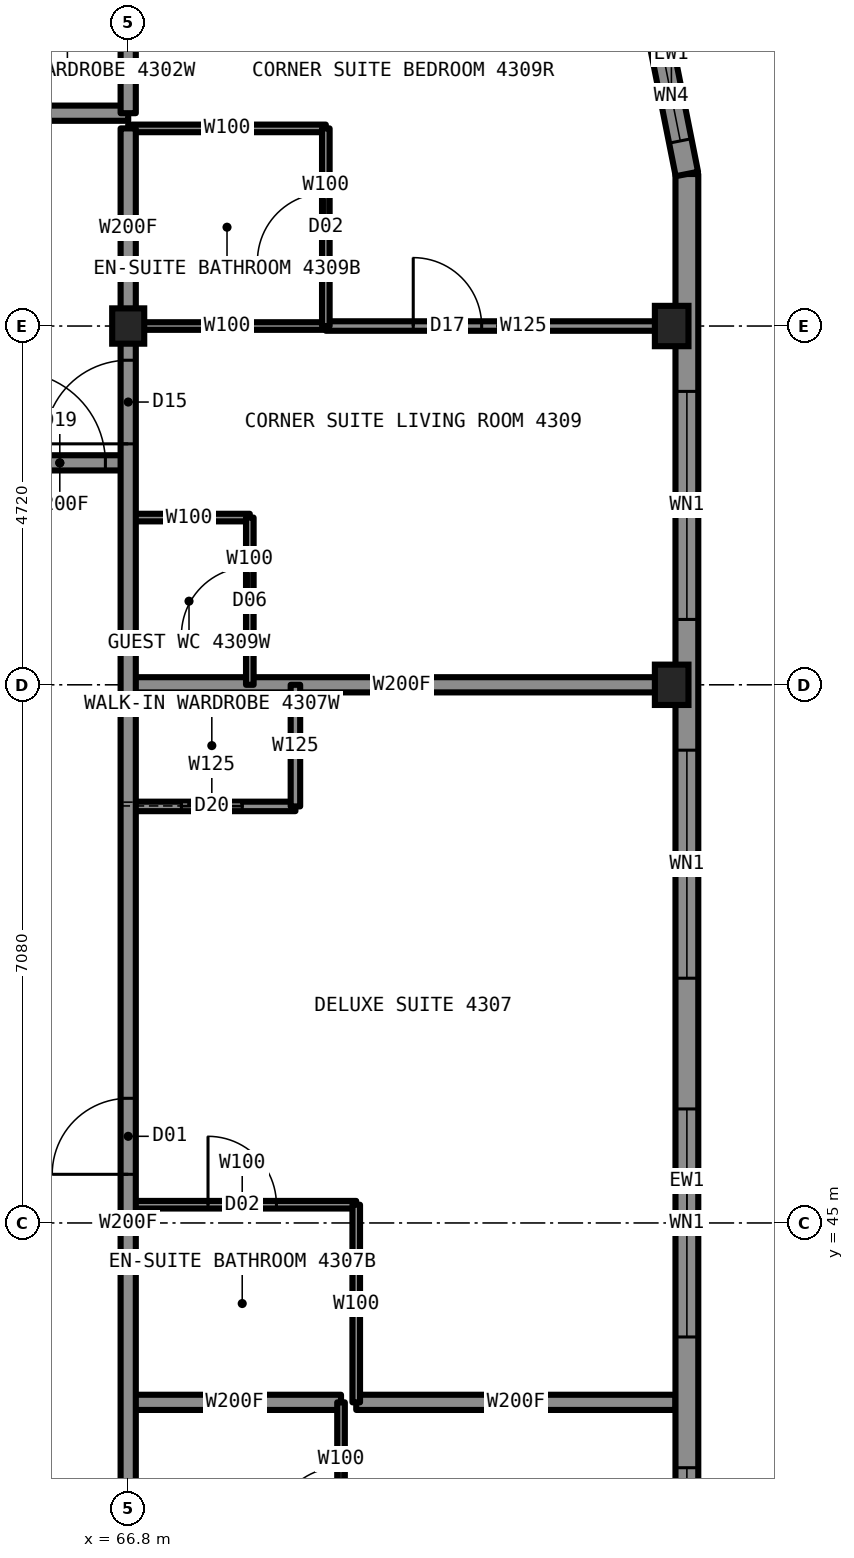
"""IFC4 building model, lengths in metres.
Left out: names, types, materials, properties, quantities, classifications, styles, units other than length and angle.
Written with IfcOpenShell. Run it as: python <this file> out.ifc"""

import sys

from ifc_helpers import new_model, si_unit, direction, frame, frame_2d, origin, origin_2d, place, context, subcontext, project, spatial, rectangle, i_section, extrude, element, fill, save


model = new_model("IFC4")
c1 = context("Model", 3, precision=1e-05, world=origin(), true_north=direction((0.0, 1.0)))
c2 = subcontext(c1, "Body", "Model", "MODEL_VIEW")
j1 = project(units=[si_unit("LENGTHUNIT", "METRE"), si_unit("PLANEANGLEUNIT", "RADIAN")], contexts=[c1])
p1 = place(None, origin())
s1 = spatial("IfcSite", under=j1, at=p1, CompositionType="ELEMENT")
p2 = place(p1, origin())
s2 = spatial("IfcBuilding", under=s1, at=p2, CompositionType="ELEMENT")
p3 = place(p2, frame((0.0, 0.0, 161.8)))
s3 = spatial("IfcBuildingStorey", under=s2, at=p3, CompositionType="ELEMENT", Elevation=161.8)
for number, where, z_axis, x_axis in (
    (1, (73.95, 52.08, 0.0), (0.0, 0.0, 1.0), (1.0, 0.0, 0.0)),
    (2, (73.95, 56.8, 0.0), (0.0, 0.0, 1.0), (1.0, 0.0, 0.0)),
):
    element("IfcColumn", number, at=place(p3, frame(where, z_axis=z_axis, x_axis=x_axis)), inside=s3, PredefinedType="COLUMN", context=c2, shape_type="SweptSolid", body=[
        extrude(i_section(OverallWidth=0.442, OverallDepth=0.531, WebThickness=0.066, FlangeThickness=0.106, at=origin_2d()), origin(), (0.0, 0.0, 1.0), 3.5),
    ])
p4 = place(p3, frame((66.8, 56.8, 0.0), z_axis=(0.0, 0.0, 1.0), x_axis=(1.0, 0.0, 0.0)))
e3 = element("IfcColumn", 3, at=p4, inside=s3, PredefinedType="COLUMN", context=c2, shape_type="SweptSolid", body=[
    extrude(i_section(OverallWidth=0.422, OverallDepth=0.465, WebThickness=0.045, FlangeThickness=0.073, at=origin_2d()), origin(), (0.0, 0.0, 1.0), 3.5),
])
p5 = place(p3, frame((66.8, 42.64, 0.0), z_axis=(0.0, 0.0, 1.0), x_axis=(1.0, 0.0, 0.0)))
e4 = element("IfcWall", 4, at=p5, inside=s3, PredefinedType="PARTITIONING", context=c2, shape_type="SweptSolid", body=[
    extrude(rectangle(XDim=2.8, YDim=0.2, at=frame_2d((1.4, 0.0))), origin(), (0.0, 0.0, 1.0), 2.73),
])
p6 = place(p3, frame((69.8, 42.64, 0.0), z_axis=(0.0, 0.0, 1.0), x_axis=(1.0, 0.0, 0.0)))
e5 = element("IfcWall", 5, at=p6, inside=s3, PredefinedType="PARTITIONING", context=c2, shape_type="SweptSolid", body=[
    extrude(rectangle(XDim=4.2, YDim=0.2, at=frame_2d((2.1, 0.0))), origin(), (0.0, 0.0, 1.0), 2.73),
])
p7 = place(p3, frame((66.8, 45.24, 0.0), z_axis=(0.0, 0.0, 1.0), x_axis=(1.0, 0.0, 0.0)))
e6 = element("IfcWall", 6, at=p7, inside=s3, PredefinedType="PARTITIONING", context=c2, shape_type="SweptSolid", body=[
    extrude(rectangle(XDim=3.0, YDim=0.1, at=frame_2d((1.5, 0.0))), origin(), (0.0, 0.0, 1.0), 3.33),
])
p8 = place(p7, frame((1.05, 0.0, 0.0)))
e7 = element("IfcOpeningElement", 7, at=p8, cuts=e6, PredefinedType="OPENING", context=c2, shape_type="SweptSolid", body=[
    extrude(rectangle(XDim=0.9, YDim=2.1, at=frame_2d((0.45, 1.05))), frame((0.0, 0.06, 0.0), z_axis=(0.0, -1.0, 0.0), x_axis=(1.0, 0.0, 0.0)), (0.0, 0.0, 1.0), 0.12),
])
p9 = place(p3, frame((65.0, 55.0, 0.0), z_axis=(0.0, 0.0, 1.0), x_axis=(1.0, 0.0, 0.0)))
e8 = element("IfcWall", 8, at=p9, inside=s3, PredefinedType="PARTITIONING", context=c2, shape_type="SweptSolid", body=[
    extrude(rectangle(XDim=1.8, YDim=0.2, at=frame_2d((0.9, 0.0))), origin(), (0.0, 0.0, 1.0), 3.33),
])
p10 = place(p9, frame((0.3, 0.0, 0.0)))
e9 = element("IfcOpeningElement", 9, at=p10, cuts=e8, PredefinedType="OPENING", context=c2, shape_type="SweptSolid", body=[
    extrude(rectangle(XDim=1.2, YDim=2.2, at=frame_2d((0.6, 1.1))), frame((0.0, 0.11, 0.0), z_axis=(0.0, -1.0, 0.0), x_axis=(1.0, 0.0, 0.0)), (0.0, 0.0, 1.0), 0.22),
])
p11 = place(p3, frame((66.8, 56.8, 0.0), z_axis=(0.0, 0.0, 1.0), x_axis=(1.0, 0.0, 0.0)))
e10 = element("IfcWall", 10, at=p11, inside=s3, PredefinedType="PARTITIONING", context=c2, shape_type="SweptSolid", body=[
    extrude(rectangle(XDim=2.6, YDim=0.1, at=frame_2d((1.3, 0.0))), origin(), (0.0, 0.0, 1.0), 2.573),
])
p12 = place(p3, frame((69.4, 56.8, 0.0), z_axis=(0.0, 0.0, 1.0), x_axis=(1.0, 0.0, 0.0)))
e11 = element("IfcWall", 11, at=p12, inside=s3, PredefinedType="PARTITIONING", context=c2, shape_type="SweptSolid", body=[
    extrude(rectangle(XDim=4.6, YDim=0.125, at=frame_2d((2.3, 0.0))), origin(), (0.0, 0.0, 1.0), 2.573),
])
p13 = place(p12, frame((1.15, 0.0, 0.0)))
e12 = element("IfcOpeningElement", 12, at=p13, cuts=e11, PredefinedType="OPENING", context=c2, shape_type="SweptSolid", body=[
    extrude(rectangle(XDim=0.9, YDim=2.2, at=frame_2d((0.45, 1.1))), frame((0.0, 0.073, 0.0), z_axis=(0.0, -1.0, 0.0), x_axis=(1.0, 0.0, 0.0)), (0.0, 0.0, 1.0), 0.145),
])
p14 = place(p3, frame((66.8, 59.4, 0.0), z_axis=(0.0, 0.0, 1.0), x_axis=(1.0, 0.0, 0.0)))
e13 = element("IfcWall", 13, at=p14, inside=s3, PredefinedType="PARTITIONING", context=c2, shape_type="SweptSolid", body=[
    extrude(rectangle(XDim=2.6, YDim=0.1, at=frame_2d((1.3, 0.0))), origin(), (0.0, 0.0, 1.0), 3.33),
])
p15 = place(p3, frame((43.2, 59.6, 0.0), z_axis=(0.0, 0.0, 1.0), x_axis=(1.0, 0.0, 0.0)))
e14 = element("IfcWall", 14, at=p15, inside=s3, PredefinedType="PARTITIONING", context=c2, shape_type="SweptSolid", body=[
    extrude(rectangle(XDim=23.6, YDim=0.2, at=frame_2d((11.8, 0.0))), origin(), (0.0, 0.0, 1.0), 3.33),
])
p16 = place(p15, frame((1.85, 0.0, 0.0)))
e15 = element("IfcOpeningElement", 15, at=p16, cuts=e14, PredefinedType="OPENING", context=c2, shape_type="SweptSolid", body=[
    extrude(rectangle(XDim=1.1, YDim=2.2, at=frame_2d((0.55, 1.1))), frame((0.0, 0.11, 0.0), z_axis=(0.0, -1.0, 0.0), x_axis=(1.0, 0.0, 0.0)), (0.0, 0.0, 1.0), 0.22),
])
p17 = place(p15, frame((17.16, 0.0, 0.0)))
e16 = element("IfcOpeningElement", 16, at=p17, cuts=e14, PredefinedType="OPENING", context=c2, shape_type="SweptSolid", body=[
    extrude(rectangle(XDim=1.0, YDim=2.2, at=frame_2d((0.5, 1.1))), frame((0.0, 0.11, 0.0), z_axis=(0.0, -1.0, 0.0), x_axis=(1.0, 0.0, 0.0)), (0.0, 0.0, 1.0), 0.22),
])
p18 = place(p3, frame((66.8, 50.48, 0.0), z_axis=(0.0, 0.0, 1.0), x_axis=(1.0, 0.0, 0.0)))
e17 = element("IfcWall", 17, at=p18, inside=s3, PredefinedType="PARTITIONING", context=c2, shape_type="SweptSolid", body=[
    extrude(rectangle(XDim=2.2, YDim=0.125, at=frame_2d((1.1, 0.0))), origin(), (0.0, 0.0, 1.0), 3.33),
])
p19 = place(p18, frame((0.7, 0.0, 0.0)))
e18 = element("IfcOpeningElement", 18, at=p19, cuts=e17, PredefinedType="OPENING", context=c2, shape_type="SweptSolid", body=[
    extrude(rectangle(XDim=0.8, YDim=2.1, at=frame_2d((0.4, 1.05))), frame((0.0, 0.073, 0.0), z_axis=(0.0, -1.0, 0.0), x_axis=(1.0, 0.0, 0.0)), (0.0, 0.0, 1.0), 0.145),
])
p20 = place(p3, frame((66.8, 52.08, 0.0), z_axis=(0.0, 0.0, 1.0), x_axis=(1.0, 0.0, 0.0)))
e19 = element("IfcWall", 19, at=p20, inside=s3, PredefinedType="PARTITIONING", context=c2, shape_type="SweptSolid", body=[
    extrude(rectangle(XDim=7.2, YDim=0.2, at=frame_2d((3.6, 0.0))), origin(), (0.0, 0.0, 1.0), 2.573),
])
p21 = place(p3, frame((66.8, 54.28, 0.0), z_axis=(0.0, 0.0, 1.0), x_axis=(1.0, 0.0, 0.0)))
e20 = element("IfcWall", 20, at=p21, inside=s3, PredefinedType="PARTITIONING", context=c2, shape_type="SweptSolid", body=[
    extrude(rectangle(XDim=1.6, YDim=0.1, at=frame_2d((0.8, 0.0))), origin(), (0.0, 0.0, 1.0), 3.33),
])
p22 = place(p3, frame((66.8, 33.22, 0.0), z_axis=(0.0, 0.0, 1.0), x_axis=(0.0, 1.0, 0.0)))
e21 = element("IfcWall", 21, at=p22, inside=s3, PredefinedType="PARTITIONING", context=c2, shape_type="SweptSolid", body=[
    extrude(rectangle(XDim=23.56, YDim=0.2, at=frame_2d((11.78, 0.0))), origin(), (0.0, 0.0, 1.0), 3.33),
])
p23 = place(p22, frame((5.1, 0.0, 0.0)))
e22 = element("IfcOpeningElement", 22, at=p23, cuts=e21, PredefinedType="OPENING", context=c2, shape_type="SweptSolid", body=[
    extrude(rectangle(XDim=1.0, YDim=2.2, at=frame_2d((0.5, 1.1))), frame((0.0, 0.11, 0.0), z_axis=(0.0, -1.0, 0.0), x_axis=(1.0, 0.0, 0.0)), (0.0, 0.0, 1.0), 0.22),
])
p24 = place(p22, frame((12.42, 0.0, 0.0)))
e23 = element("IfcOpeningElement", 23, at=p24, cuts=e21, PredefinedType="OPENING", context=c2, shape_type="SweptSolid", body=[
    extrude(rectangle(XDim=1.0, YDim=2.2, at=frame_2d((0.5, 1.1))), frame((0.0, 0.11, 0.0), z_axis=(0.0, -1.0, 0.0), x_axis=(1.0, 0.0, 0.0)), (0.0, 0.0, 1.0), 0.22),
])
p25 = place(p22, frame((22.03, 0.0, 0.0)))
e24 = element("IfcOpeningElement", 24, at=p25, cuts=e21, PredefinedType="OPENING", context=c2, shape_type="SweptSolid", body=[
    extrude(rectangle(XDim=1.1, YDim=2.2, at=frame_2d((0.55, 1.1))), frame((0.0, 0.11, 0.0), z_axis=(0.0, -1.0, 0.0), x_axis=(1.0, 0.0, 0.0)), (0.0, 0.0, 1.0), 0.22),
])
p26 = place(p22, frame((0.63, 0.0, 0.0)))
e25 = element("IfcOpeningElement", 25, at=p26, cuts=e21, PredefinedType="OPENING", context=c2, shape_type="SweptSolid", body=[
    extrude(rectangle(XDim=1.1, YDim=2.2, at=frame_2d((0.55, 1.1))), frame((0.0, 0.11, 0.0), z_axis=(0.0, -1.0, 0.0), x_axis=(1.0, 0.0, 0.0)), (0.0, 0.0, 1.0), 0.22),
])
p27 = place(p3, frame((66.8, 59.6, 0.0), z_axis=(0.0, 0.0, 1.0), x_axis=(0.0, 1.0, 0.0)))
e26 = element("IfcWall", 26, at=p27, inside=s3, PredefinedType="PARTITIONING", context=c2, shape_type="SweptSolid", body=[
    extrude(rectangle(XDim=4.4, YDim=0.2, at=frame_2d((2.2, 0.0))), origin(), (0.0, 0.0, 1.0), 2.573),
])
p28 = place(p3, frame((68.4, 52.08, 0.0), z_axis=(0.0, 0.0, 1.0), x_axis=(0.0, 1.0, 0.0)))
e27 = element("IfcWall", 27, at=p28, inside=s3, PredefinedType="PARTITIONING", context=c2, shape_type="SweptSolid", body=[
    extrude(rectangle(XDim=2.2, YDim=0.1, at=frame_2d((1.1, 0.0))), origin(), (0.0, 0.0, 1.0), 3.33),
])
p29 = place(p28, frame((0.65, 0.0, 0.0)))
e28 = element("IfcOpeningElement", 28, at=p29, cuts=e27, PredefinedType="OPENING", context=c2, shape_type="SweptSolid", body=[
    extrude(rectangle(XDim=0.9, YDim=2.1, at=frame_2d((0.45, 1.05))), frame((0.0, 0.06, 0.0), z_axis=(0.0, -1.0, 0.0), x_axis=(1.0, 0.0, 0.0)), (0.0, 0.0, 1.0), 0.12),
])
p30 = place(p3, frame((69.0, 50.48, 0.0), z_axis=(0.0, 0.0, 1.0), x_axis=(0.0, 1.0, 0.0)))
e29 = element("IfcWall", 29, at=p30, inside=s3, PredefinedType="PARTITIONING", context=c2, shape_type="SweptSolid", body=[
    extrude(rectangle(XDim=1.6, YDim=0.125, at=frame_2d((0.8, 0.0))), origin(), (0.0, 0.0, 1.0), 3.33),
])
p31 = place(p3, frame((69.4, 56.8, 0.0), z_axis=(0.0, 0.0, 1.0), x_axis=(0.0, 1.0, 0.0)))
e30 = element("IfcWall", 30, at=p31, inside=s3, PredefinedType="PARTITIONING", context=c2, shape_type="SweptSolid", body=[
    extrude(rectangle(XDim=2.6, YDim=0.1, at=frame_2d((1.3, 0.0))), origin(), (0.0, 0.0, 1.0), 3.33),
])
p32 = place(p31, frame((0.85, 0.0, 0.0)))
e31 = element("IfcOpeningElement", 31, at=p32, cuts=e30, PredefinedType="OPENING", context=c2, shape_type="SweptSolid", body=[
    extrude(rectangle(XDim=0.9, YDim=2.1, at=frame_2d((0.45, 1.05))), frame((0.0, 0.06, 0.0), z_axis=(0.0, -1.0, 0.0), x_axis=(1.0, 0.0, 0.0)), (0.0, 0.0, 1.0), 0.12),
])
p33 = place(p3, frame((69.6, 40.04, 0.0), z_axis=(0.0, 0.0, 1.0), x_axis=(0.0, 1.0, 0.0)))
e32 = element("IfcWall", 32, at=p33, inside=s3, PredefinedType="PARTITIONING", context=c2, shape_type="SweptSolid", body=[
    extrude(rectangle(XDim=2.6, YDim=0.1, at=frame_2d((1.3, 0.0))), origin(), (0.0, 0.0, 1.0), 3.33),
])
p34 = place(p33, frame((0.85, 0.0, 0.0)))
e33 = element("IfcOpeningElement", 33, at=p34, cuts=e32, PredefinedType="OPENING", context=c2, shape_type="SweptSolid", body=[
    extrude(rectangle(XDim=0.9, YDim=2.1, at=frame_2d((0.45, 1.05))), frame((0.0, 0.06, 0.0), z_axis=(0.0, -1.0, 0.0), x_axis=(1.0, 0.0, 0.0)), (0.0, 0.0, 1.0), 0.12),
])
p35 = place(p3, frame((69.8, 42.64, 0.0), z_axis=(0.0, 0.0, 1.0), x_axis=(0.0, 1.0, 0.0)))
e34 = element("IfcWall", 34, at=p35, inside=s3, PredefinedType="PARTITIONING", context=c2, shape_type="SweptSolid", body=[
    extrude(rectangle(XDim=2.6, YDim=0.1, at=frame_2d((1.3, 0.0))), origin(), (0.0, 0.0, 1.0), 3.33),
])
p36 = place(p3, frame((74.15, 31.2, 0.0), z_axis=(0.0, 0.0, 1.0), x_axis=(0.0, 1.0, 0.0)))
e35 = element("IfcWall", 35, at=p36, inside=s3, PredefinedType="SOLIDWALL", context=c2, shape_type="SweptSolid", body=[
    extrude(rectangle(XDim=27.6, YDim=0.3, at=frame_2d((13.8, 0.0))), origin(), (0.0, 0.0, 1.0), 2.83),
])
p37 = place(p36, frame((2.86, 0.0, 0.3)))
e36 = element("IfcOpeningElement", 36, at=p37, cuts=e35, PredefinedType="OPENING", context=c2, shape_type="SweptSolid", body=[
    extrude(rectangle(XDim=3.0, YDim=2.0, at=frame_2d((1.5, 1.0))), frame((0.0, 0.16, 0.0), z_axis=(0.0, -1.0, 0.0), x_axis=(1.0, 0.0, 0.0)), (0.0, 0.0, 1.0), 0.32),
])
p38 = place(p36, frame((7.58, 0.0, 0.3)))
e37 = element("IfcOpeningElement", 37, at=p38, cuts=e35, PredefinedType="OPENING", context=c2, shape_type="SweptSolid", body=[
    extrude(rectangle(XDim=3.0, YDim=2.0, at=frame_2d((1.5, 1.0))), frame((0.0, 0.16, 0.0), z_axis=(0.0, -1.0, 0.0), x_axis=(1.0, 0.0, 0.0)), (0.0, 0.0, 1.0), 0.32),
])
p39 = place(p36, frame((12.3, 0.0, 0.3)))
e38 = element("IfcOpeningElement", 38, at=p39, cuts=e35, PredefinedType="OPENING", context=c2, shape_type="SweptSolid", body=[
    extrude(rectangle(XDim=3.0, YDim=2.0, at=frame_2d((1.5, 1.0))), frame((0.0, 0.16, 0.0), z_axis=(0.0, -1.0, 0.0), x_axis=(1.0, 0.0, 0.0)), (0.0, 0.0, 1.0), 0.32),
])
p40 = place(p36, frame((17.02, 0.0, 0.3)))
e39 = element("IfcOpeningElement", 39, at=p40, cuts=e35, PredefinedType="OPENING", context=c2, shape_type="SweptSolid", body=[
    extrude(rectangle(XDim=3.0, YDim=2.0, at=frame_2d((1.5, 1.0))), frame((0.0, 0.16, 0.0), z_axis=(0.0, -1.0, 0.0), x_axis=(1.0, 0.0, 0.0)), (0.0, 0.0, 1.0), 0.32),
])
p41 = place(p36, frame((21.74, 0.0, 0.3)))
e40 = element("IfcOpeningElement", 40, at=p41, cuts=e35, PredefinedType="OPENING", context=c2, shape_type="SweptSolid", body=[
    extrude(rectangle(XDim=3.0, YDim=2.0, at=frame_2d((1.5, 1.0))), frame((0.0, 0.16, 0.0), z_axis=(0.0, -1.0, 0.0), x_axis=(1.0, 0.0, 0.0)), (0.0, 0.0, 1.0), 0.32),
])
p42 = place(p3, frame((74.15, 58.8, 0.0), z_axis=(0.0, 0.0, 1.0), x_axis=(-0.195081421501, 0.980787050784, 0.0)))
e41 = element("IfcWall", 41, at=p42, inside=s3, PredefinedType="SOLIDWALL", context=c2, shape_type="SweptSolid", body=[
    extrude(rectangle(XDim=2.087, YDim=0.3, at=frame_2d((1.044, 0.0))), origin(), (0.0, 0.0, 1.0), 3.33),
])
p43 = place(p42, frame((0.444, 0.0, 0.3)))
e42 = element("IfcOpeningElement", 42, at=p43, cuts=e41, PredefinedType="OPENING", context=c2, shape_type="SweptSolid", body=[
    extrude(rectangle(XDim=1.2, YDim=2.0, at=frame_2d((0.6, 1.0))), frame((0.0, 0.16, 0.0), z_axis=(0.0, -1.0, 0.0), x_axis=(1.0, 0.0, 0.0)), (0.0, 0.0, 1.0), 0.32),
])
p44 = place(p3, frame((66.8, 56.78, 0.0), z_axis=(0.0, 0.0, 1.0), x_axis=(0.0, 1.0, 0.0)))
e43 = element("IfcWall", 43, at=p44, inside=s3, PredefinedType="PARTITIONING", context=c2, shape_type="SweptSolid", body=[
    extrude(rectangle(XDim=2.62, YDim=0.2, at=frame_2d((1.31, 0.0))), origin(), (0.0, 0.0, 1.0), 2.573),
])
p45 = place(p10, origin())
e44 = element("IfcDoor", 44, at=p45, inside=s3, OperationType="SINGLE_SWING_LEFT", PredefinedType="DOOR", context=c2, shape_type="SweptSolid", body=[
    extrude(rectangle(XDim=1.2, YDim=2.2, at=frame_2d((0.6, 1.1))), frame((0.0, 0.025, 0.0), z_axis=(0.0, -1.0, 0.0), x_axis=(1.0, 0.0, 0.0)), (0.0, 0.0, 1.0), 0.05),
])
fill(e9, e44)
p46 = place(p34, origin())
e45 = element("IfcDoor", 45, at=p46, inside=s3, OperationType="SINGLE_SWING_RIGHT", PredefinedType="DOOR", context=c2, shape_type="SweptSolid", body=[
    extrude(rectangle(XDim=0.9, YDim=2.1, at=frame_2d((0.45, 1.05))), frame((0.0, 0.025, 0.0), z_axis=(0.0, -1.0, 0.0), x_axis=(1.0, 0.0, 0.0)), (0.0, 0.0, 1.0), 0.05),
])
fill(e33, e45)
p47 = place(p24, origin())
e46 = element("IfcDoor", 46, at=p47, inside=s3, OperationType="SINGLE_SWING_LEFT", PredefinedType="DOOR", context=c2, shape_type="SweptSolid", body=[
    extrude(rectangle(XDim=1.0, YDim=2.2, at=frame_2d((0.5, 1.1))), frame((0.0, 0.025, 0.0), z_axis=(0.0, -1.0, 0.0), x_axis=(1.0, 0.0, 0.0)), (0.0, 0.0, 1.0), 0.05),
])
fill(e23, e46)
p48 = place(p8, origin())
e47 = element("IfcDoor", 47, at=p48, inside=s3, OperationType="SINGLE_SWING_RIGHT", PredefinedType="DOOR", context=c2, shape_type="SweptSolid", body=[
    extrude(rectangle(XDim=0.9, YDim=2.1, at=frame_2d((0.45, 1.05))), frame((0.0, 0.025, 0.0), z_axis=(0.0, -1.0, 0.0), x_axis=(1.0, 0.0, 0.0)), (0.0, 0.0, 1.0), 0.05),
])
fill(e7, e47)
p49 = place(p19, origin())
e48 = element("IfcDoor", 48, at=p49, inside=s3, OperationType="SLIDING_TO_LEFT", PredefinedType="DOOR", context=c2, shape_type="SweptSolid", body=[
    extrude(rectangle(XDim=0.8, YDim=2.1, at=frame_2d((0.4, 1.05))), frame((0.0, 0.025, 0.0), z_axis=(0.0, -1.0, 0.0), x_axis=(1.0, 0.0, 0.0)), (0.0, 0.0, 1.0), 0.05),
])
fill(e18, e48)
p50 = place(p25, origin())
e49 = element("IfcDoor", 49, at=p50, inside=s3, OperationType="SINGLE_SWING_LEFT", PredefinedType="DOOR", context=c2, shape_type="SweptSolid", body=[
    extrude(rectangle(XDim=1.1, YDim=2.2, at=frame_2d((0.55, 1.1))), frame((0.0, 0.025, 0.0), z_axis=(0.0, -1.0, 0.0), x_axis=(1.0, 0.0, 0.0)), (0.0, 0.0, 1.0), 0.05),
])
fill(e24, e49)
p51 = place(p32, origin())
e50 = element("IfcDoor", 50, at=p51, inside=s3, OperationType="SINGLE_SWING_RIGHT", PredefinedType="DOOR", context=c2, shape_type="SweptSolid", body=[
    extrude(rectangle(XDim=0.9, YDim=2.1, at=frame_2d((0.45, 1.05))), frame((0.0, 0.025, 0.0), z_axis=(0.0, -1.0, 0.0), x_axis=(1.0, 0.0, 0.0)), (0.0, 0.0, 1.0), 0.05),
])
fill(e31, e50)
p52 = place(p13, origin())
e51 = element("IfcDoor", 51, at=p52, inside=s3, OperationType="SINGLE_SWING_LEFT", PredefinedType="DOOR", context=c2, shape_type="SweptSolid", body=[
    extrude(rectangle(XDim=0.9, YDim=2.2, at=frame_2d((0.45, 1.1))), frame((0.0, 0.025, 0.0), z_axis=(0.0, -1.0, 0.0), x_axis=(1.0, 0.0, 0.0)), (0.0, 0.0, 1.0), 0.05),
])
fill(e12, e51)
p53 = place(p29, origin())
e52 = element("IfcDoor", 52, at=p53, inside=s3, OperationType="SINGLE_SWING_LEFT", PredefinedType="DOOR", context=c2, shape_type="SweptSolid", body=[
    extrude(rectangle(XDim=0.9, YDim=2.1, at=frame_2d((0.45, 1.05))), frame((0.0, 0.025, 0.0), z_axis=(0.0, -1.0, 0.0), x_axis=(1.0, 0.0, 0.0)), (0.0, 0.0, 1.0), 0.05),
])
fill(e28, e52)
p54 = place(p38, origin())
e53 = element("IfcWindow", 53, at=p54, inside=s3, PartitioningType="SINGLE_PANEL", PredefinedType="WINDOW", context=c2, shape_type="SweptSolid", body=[
    extrude(rectangle(XDim=3.0, YDim=2.0, at=frame_2d((1.5, 1.0))), frame((0.0, 0.13, 0.0), z_axis=(0.0, -1.0, 0.0), x_axis=(1.0, 0.0, 0.0)), (0.0, 0.0, 1.0), 0.06),
])
fill(e37, e53)
p55 = place(p39, origin())
e54 = element("IfcWindow", 54, at=p55, inside=s3, PartitioningType="SINGLE_PANEL", PredefinedType="WINDOW", context=c2, shape_type="SweptSolid", body=[
    extrude(rectangle(XDim=3.0, YDim=2.0, at=frame_2d((1.5, 1.0))), frame((0.0, 0.13, 0.0), z_axis=(0.0, -1.0, 0.0), x_axis=(1.0, 0.0, 0.0)), (0.0, 0.0, 1.0), 0.06),
])
fill(e38, e54)
p56 = place(p40, origin())
e55 = element("IfcWindow", 55, at=p56, inside=s3, PartitioningType="SINGLE_PANEL", PredefinedType="WINDOW", context=c2, shape_type="SweptSolid", body=[
    extrude(rectangle(XDim=3.0, YDim=2.0, at=frame_2d((1.5, 1.0))), frame((0.0, 0.13, 0.0), z_axis=(0.0, -1.0, 0.0), x_axis=(1.0, 0.0, 0.0)), (0.0, 0.0, 1.0), 0.06),
])
fill(e39, e55)
p57 = place(p41, origin())
e56 = element("IfcWindow", 56, at=p57, inside=s3, PartitioningType="SINGLE_PANEL", PredefinedType="WINDOW", context=c2, shape_type="SweptSolid", body=[
    extrude(rectangle(XDim=3.0, YDim=2.0, at=frame_2d((1.5, 1.0))), frame((0.0, 0.13, 0.0), z_axis=(0.0, -1.0, 0.0), x_axis=(1.0, 0.0, 0.0)), (0.0, 0.0, 1.0), 0.06),
])
fill(e40, e56)
p58 = place(p43, origin())
e57 = element("IfcWindow", 57, at=p58, inside=s3, PartitioningType="SINGLE_PANEL", PredefinedType="WINDOW", context=c2, shape_type="SweptSolid", body=[
    extrude(rectangle(XDim=1.2, YDim=2.0, at=frame_2d((0.6, 1.0))), frame((0.0, 0.13, 0.0), z_axis=(0.0, -1.0, 0.0), x_axis=(1.0, 0.0, 0.0)), (0.0, 0.0, 1.0), 0.06),
])
fill(e42, e57)
save(model, sys.argv[1])
